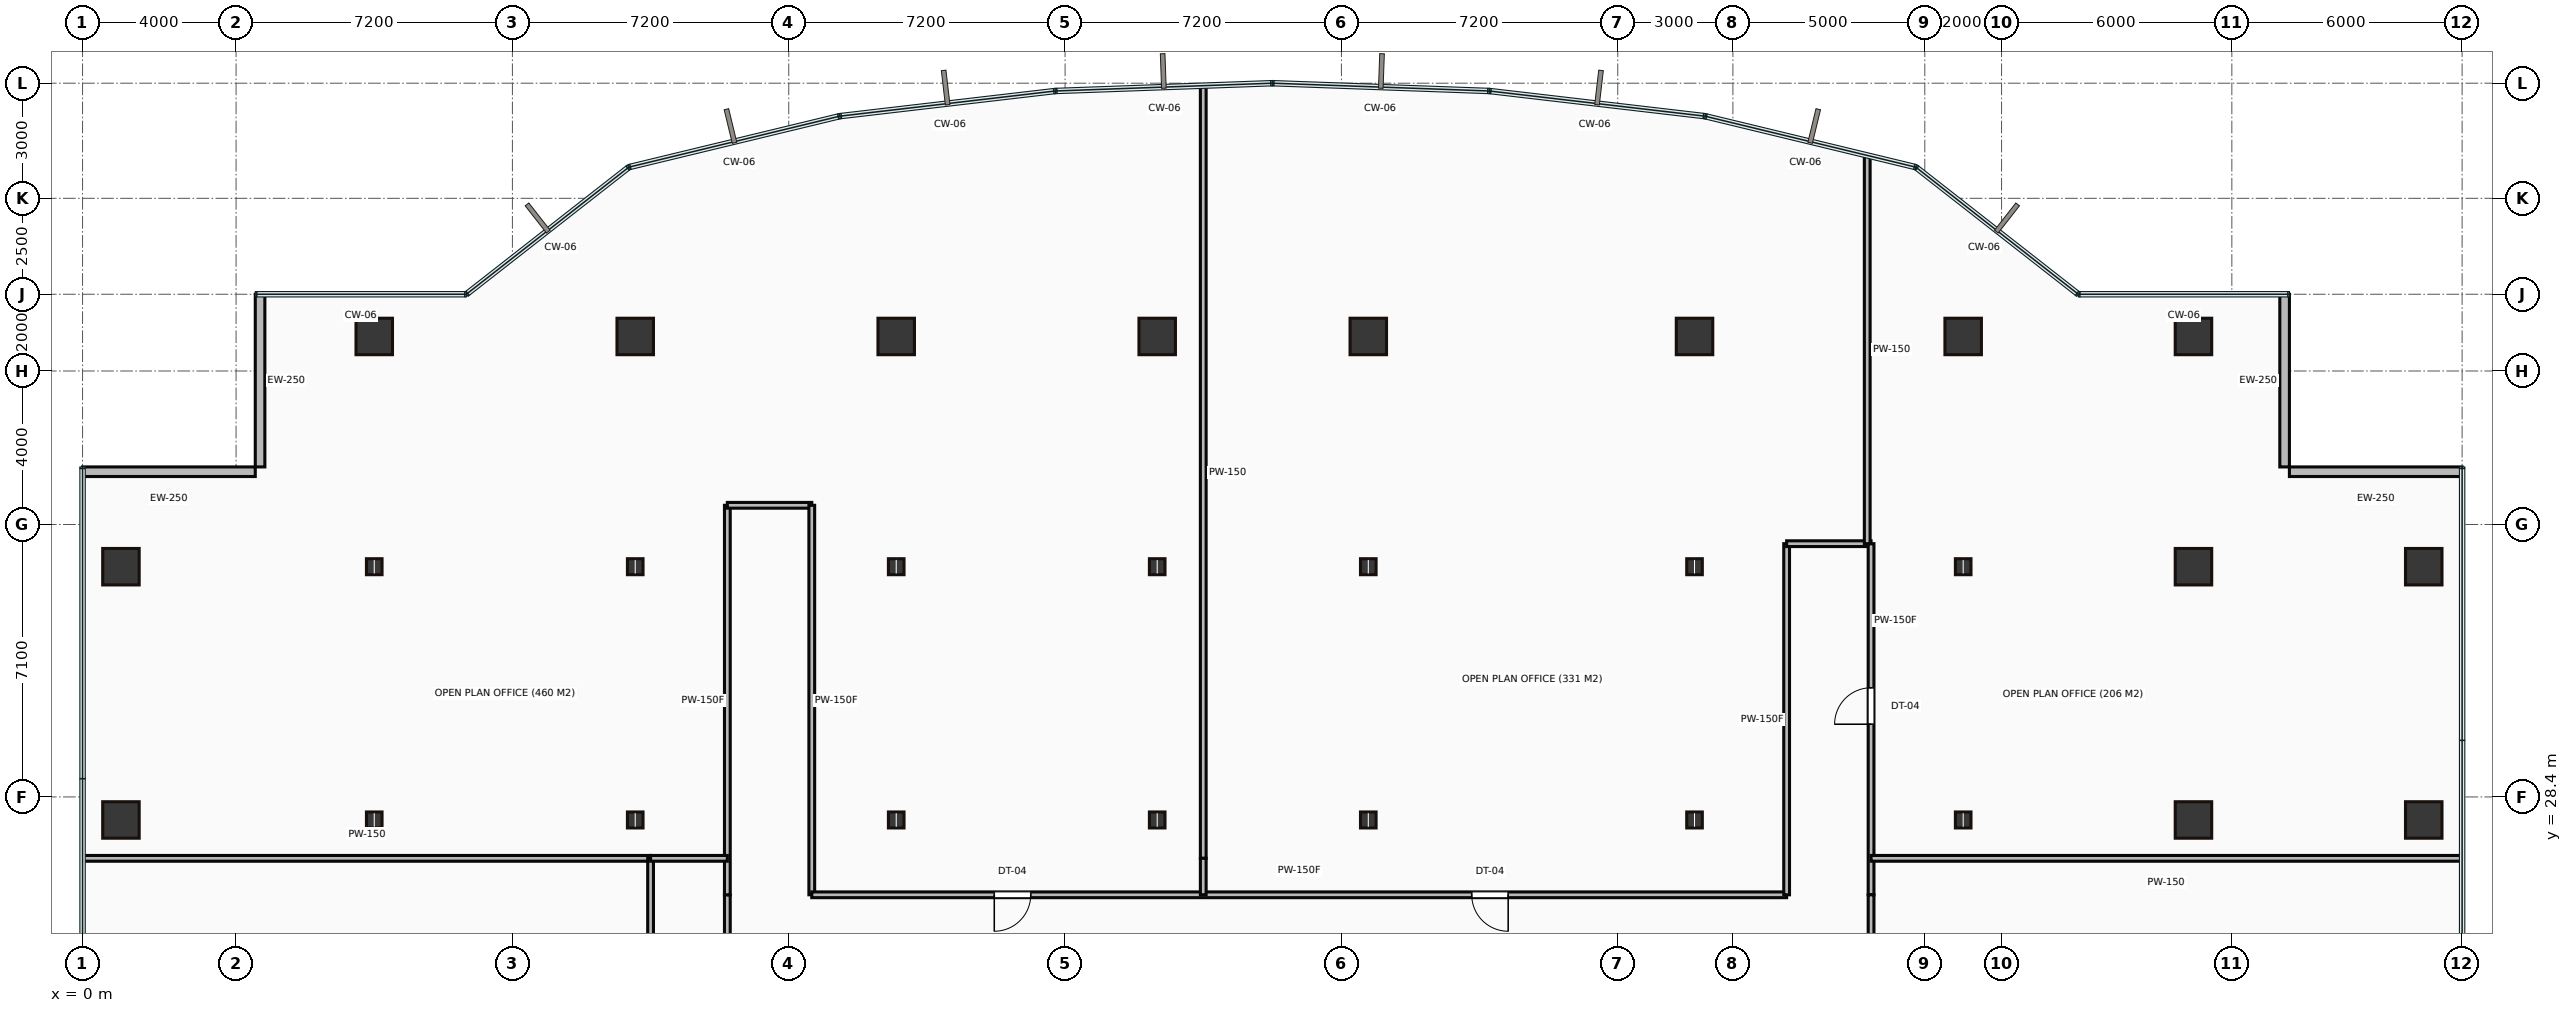
"""IFC4 building model, lengths in metres.
Left out: names, types, materials, properties, quantities, classifications, styles, units other than length and angle.
Written with IfcOpenShell. Run it as: python <this file> out.ifc"""

import sys

from ifc_helpers import new_model, si_unit, direction, frame, frame_2d, origin, origin_2d, place, context, subcontext, project, spatial, rectangle, hollow_rectangle, i_section, extrude, source, transform, mapped, element, fill, save


model = new_model("IFC4")
c1 = context("Model", 3, precision=1e-05, world=origin(), true_north=direction((0.0, 1.0)))
c2 = subcontext(c1, "Body", "Model", "MODEL_VIEW")
j1 = project(units=[si_unit("LENGTHUNIT", "METRE"), si_unit("PLANEANGLEUNIT", "RADIAN")], contexts=[c1])
p1 = place(None, origin())
s1 = spatial("IfcSite", under=j1, at=p1, CompositionType="ELEMENT")
p2 = place(p1, origin())
s2 = spatial("IfcBuilding", under=s1, at=p2, CompositionType="ELEMENT")
p3 = place(p2, frame((0.0, 0.0, 79.95)))
s3 = spatial("IfcBuildingStorey", under=s2, at=p3, CompositionType="ELEMENT", Elevation=79.95)
m1 = source(origin(), c2, "Body", "SweptSolid", [
    extrude(hollow_rectangle(XDim=0.95, YDim=0.95, WallThickness=0.045, at=origin_2d()), origin(), (0.0, 0.0, 1.0), 4.2),
])
for number, where, z_axis, x_axis in (
    (1, (1.0, 27.8, 0.0), (0.0, 0.0, 1.0), (1.0, 0.0, 0.0)),
    (2, (1.0, 34.4, 0.0), (0.0, 0.0, 1.0), (1.0, 0.0, 0.0)),
):
    element("IfcColumn", number, at=place(p3, frame(where, z_axis=z_axis, x_axis=x_axis)), inside=s3, PredefinedType="COLUMN", context=c2, shape_type="MappedRepresentation", body=[
        mapped(m1, transform((0.0, 0.0, 0.0))),
    ])
m2 = source(origin(), c2, "Body", "SweptSolid", [
    extrude(i_section(OverallWidth=0.406, OverallDepth=0.416, WebThickness=0.03, FlangeThickness=0.048, at=origin_2d()), origin(), (0.0, 0.0, 1.0), 4.2),
])
for number, where, z_axis, x_axis in (
    (3, (7.6, 27.8, 0.0), (0.0, 0.0, 1.0), (1.0, 0.0, 0.0)),
    (4, (7.6, 34.4, 0.0), (0.0, 0.0, 1.0), (1.0, 0.0, 0.0)),
):
    element("IfcColumn", number, at=place(p3, frame(where, z_axis=z_axis, x_axis=x_axis)), inside=s3, PredefinedType="COLUMN", context=c2, shape_type="MappedRepresentation", body=[
        mapped(m2, transform((0.0, 0.0, 0.0))),
    ])
p4 = place(p3, frame((7.6, 40.4, 0.0), z_axis=(0.0, 0.0, 1.0), x_axis=(1.0, 0.0, 0.0)))
e5 = element("IfcColumn", 5, at=p4, inside=s3, PredefinedType="COLUMN", context=c2, shape_type="MappedRepresentation", body=[
    mapped(m1, transform((0.0, 0.0, 0.0))),
])
for number, where, z_axis, x_axis in (
    (6, (14.4, 27.8, 0.0), (0.0, 0.0, 1.0), (1.0, 0.0, 0.0)),
    (7, (14.4, 34.4, 0.0), (0.0, 0.0, 1.0), (1.0, 0.0, 0.0)),
):
    element("IfcColumn", number, at=place(p3, frame(where, z_axis=z_axis, x_axis=x_axis)), inside=s3, PredefinedType="COLUMN", context=c2, shape_type="MappedRepresentation", body=[
        mapped(m2, transform((0.0, 0.0, 0.0))),
    ])
p5 = place(p3, frame((14.4, 40.4, 0.0), z_axis=(0.0, 0.0, 1.0), x_axis=(1.0, 0.0, 0.0)))
e8 = element("IfcColumn", 8, at=p5, inside=s3, PredefinedType="COLUMN", context=c2, shape_type="MappedRepresentation", body=[
    mapped(m1, transform((0.0, 0.0, 0.0))),
])
for number, where, z_axis, x_axis in (
    (9, (21.2, 27.8, 0.0), (0.0, 0.0, 1.0), (1.0, 0.0, 0.0)),
    (10, (21.2, 34.4, 0.0), (0.0, 0.0, 1.0), (1.0, 0.0, 0.0)),
):
    element("IfcColumn", number, at=place(p3, frame(where, z_axis=z_axis, x_axis=x_axis)), inside=s3, PredefinedType="COLUMN", context=c2, shape_type="MappedRepresentation", body=[
        mapped(m2, transform((0.0, 0.0, 0.0))),
    ])
p6 = place(p3, frame((21.2, 40.4, 0.0), z_axis=(0.0, 0.0, 1.0), x_axis=(1.0, 0.0, 0.0)))
e11 = element("IfcColumn", 11, at=p6, inside=s3, PredefinedType="COLUMN", context=c2, shape_type="MappedRepresentation", body=[
    mapped(m1, transform((0.0, 0.0, 0.0))),
])
for number, where, z_axis, x_axis in (
    (12, (28.0, 27.8, 0.0), (0.0, 0.0, 1.0), (1.0, 0.0, 0.0)),
    (13, (28.0, 34.4, 0.0), (0.0, 0.0, 1.0), (1.0, 0.0, 0.0)),
):
    element("IfcColumn", number, at=place(p3, frame(where, z_axis=z_axis, x_axis=x_axis)), inside=s3, PredefinedType="COLUMN", context=c2, shape_type="MappedRepresentation", body=[
        mapped(m2, transform((0.0, 0.0, 0.0))),
    ])
p7 = place(p3, frame((28.0, 40.4, 0.0), z_axis=(0.0, 0.0, 1.0), x_axis=(1.0, 0.0, 0.0)))
e14 = element("IfcColumn", 14, at=p7, inside=s3, PredefinedType="COLUMN", context=c2, shape_type="MappedRepresentation", body=[
    mapped(m1, transform((0.0, 0.0, 0.0))),
])
for number, where, z_axis, x_axis in (
    (15, (33.5, 27.8, 0.0), (0.0, 0.0, 1.0), (1.0, 0.0, 0.0)),
    (16, (33.5, 34.4, 0.0), (0.0, 0.0, 1.0), (1.0, 0.0, 0.0)),
):
    element("IfcColumn", number, at=place(p3, frame(where, z_axis=z_axis, x_axis=x_axis)), inside=s3, PredefinedType="COLUMN", context=c2, shape_type="MappedRepresentation", body=[
        mapped(m2, transform((0.0, 0.0, 0.0))),
    ])
p8 = place(p3, frame((33.5, 40.4, 0.0), z_axis=(0.0, 0.0, 1.0), x_axis=(1.0, 0.0, 0.0)))
e17 = element("IfcColumn", 17, at=p8, inside=s3, PredefinedType="COLUMN", context=c2, shape_type="MappedRepresentation", body=[
    mapped(m1, transform((0.0, 0.0, 0.0))),
])
for number, where, z_axis, x_axis in (
    (18, (42.0, 27.8, 0.0), (0.0, 0.0, 1.0), (1.0, 0.0, 0.0)),
    (19, (42.0, 34.4, 0.0), (0.0, 0.0, 1.0), (1.0, 0.0, 0.0)),
):
    element("IfcColumn", number, at=place(p3, frame(where, z_axis=z_axis, x_axis=x_axis)), inside=s3, PredefinedType="COLUMN", context=c2, shape_type="MappedRepresentation", body=[
        mapped(m2, transform((0.0, 0.0, 0.0))),
    ])
p9 = place(p3, frame((42.0, 40.4, 0.0), z_axis=(0.0, 0.0, 1.0), x_axis=(1.0, 0.0, 0.0)))
e20 = element("IfcColumn", 20, at=p9, inside=s3, PredefinedType="COLUMN", context=c2, shape_type="MappedRepresentation", body=[
    mapped(m1, transform((0.0, 0.0, 0.0))),
])
for number, where, z_axis, x_axis in (
    (21, (49.0, 27.8, 0.0), (0.0, 0.0, 1.0), (1.0, 0.0, 0.0)),
    (22, (49.0, 34.4, 0.0), (0.0, 0.0, 1.0), (1.0, 0.0, 0.0)),
):
    element("IfcColumn", number, at=place(p3, frame(where, z_axis=z_axis, x_axis=x_axis)), inside=s3, PredefinedType="COLUMN", context=c2, shape_type="MappedRepresentation", body=[
        mapped(m2, transform((0.0, 0.0, 0.0))),
    ])
for number, where, z_axis, x_axis in (
    (23, (49.0, 40.4, 0.0), (0.0, 0.0, 1.0), (1.0, 0.0, 0.0)),
    (24, (55.0, 27.8, 0.0), (0.0, 0.0, 1.0), (1.0, 0.0, 0.0)),
    (25, (55.0, 34.4, 0.0), (0.0, 0.0, 1.0), (1.0, 0.0, 0.0)),
    (26, (55.0, 40.4, 0.0), (0.0, 0.0, 1.0), (1.0, 0.0, 0.0)),
    (27, (61.0, 27.8, 0.0), (0.0, 0.0, 1.0), (1.0, 0.0, 0.0)),
    (28, (61.0, 34.4, 0.0), (0.0, 0.0, 1.0), (1.0, 0.0, 0.0)),
):
    element("IfcColumn", number, at=place(p3, frame(where, z_axis=z_axis, x_axis=x_axis)), inside=s3, PredefinedType="COLUMN", context=c2, shape_type="MappedRepresentation", body=[
        mapped(m1, transform((0.0, 0.0, 0.0))),
    ])
m3 = source(origin(), c2, "Body", "SweptSolid", [
    extrude(rectangle(XDim=4.5, YDim=0.25, at=frame_2d((2.25, 0.0))), origin(), (0.0, 0.0, 1.0), 3.9),
])
for number, where, z_axis, x_axis in (
    (29, (62.0, 36.875, 0.0), (0.0, 0.0, 1.0), (-1.0, 0.0, 0.0)),
    (30, (57.375, 37.0, 0.0), (0.0, 0.0, 1.0), (0.0, 1.0, 0.0)),
    (31, (4.625, 41.5, 0.0), (0.0, 0.0, 1.0), (0.0, -1.0, 0.0)),
    (32, (4.5, 36.875, 0.0), (0.0, 0.0, 1.0), (-1.0, 0.0, 0.0)),
):
    element("IfcWall", number, at=place(p3, frame(where, z_axis=z_axis, x_axis=x_axis)), inside=s3, PredefinedType="STANDARD", context=c2, shape_type="MappedRepresentation", body=[
        mapped(m3, transform((0.0, 0.0, 0.0))),
    ])
m4 = source(origin(), c2, "Body", "SweptSolid", [
    extrude(rectangle(XDim=2.05, YDim=0.15, at=frame_2d((1.025, 0.0))), origin(), (0.0, 0.0, 1.0), 3.9),
])
p10 = place(p3, frame((16.8, 23.8, 0.0), z_axis=(0.0, 0.0, 1.0), x_axis=(0.0, 1.0, 0.0)))
e33 = element("IfcWall", 33, at=p10, inside=s3, PredefinedType="PARTITIONING", context=c2, shape_type="MappedRepresentation", body=[
    mapped(m4, transform((0.0, 0.0, 0.0))),
])
m5 = source(origin(), c2, "Body", "SweptSolid", [
    extrude(rectangle(XDim=10.15, YDim=0.15, at=frame_2d((5.075, 0.0))), origin(), (0.0, 0.0, 1.0), 3.9),
])
p11 = place(p3, frame((16.8, 25.85, 0.0), z_axis=(0.0, 0.0, 1.0), x_axis=(0.0, 1.0, 0.0)))
e34 = element("IfcWall", 34, at=p11, inside=s3, PredefinedType="PARTITIONING", context=c2, shape_type="MappedRepresentation", body=[
    mapped(m5, transform((0.0, 0.0, 0.0))),
])
m6 = source(origin(), c2, "Body", "SweptSolid", [
    extrude(rectangle(XDim=2.2, YDim=0.15, at=frame_2d((1.1, 0.0))), origin(), (0.0, 0.0, 1.0), 3.9),
])
p12 = place(p3, frame((16.8, 36.0, 0.0), z_axis=(0.0, 0.0, 1.0), x_axis=(1.0, 0.0, 0.0)))
e35 = element("IfcWall", 35, at=p12, inside=s3, PredefinedType="PARTITIONING", context=c2, shape_type="MappedRepresentation", body=[
    mapped(m6, transform((0.0, 0.0, 0.0))),
])
p13 = place(p3, frame((19.0, 36.0, 0.0), z_axis=(0.0, 0.0, 1.0), x_axis=(0.0, -1.0, 0.0)))
e36 = element("IfcWall", 36, at=p13, inside=s3, PredefinedType="PARTITIONING", context=c2, shape_type="MappedRepresentation", body=[
    mapped(m5, transform((0.0, 0.0, 0.0))),
])
m7 = source(origin(), c2, "Body", "SweptSolid", [
    extrude(rectangle(XDim=25.4, YDim=0.15, at=frame_2d((12.7, 0.0))), origin(), (0.0, 0.0, 1.0), 3.9),
])
p14 = place(p3, frame((19.0, 25.85, 0.0), z_axis=(0.0, 0.0, 1.0), x_axis=(1.0, 0.0, 0.0)))
e37 = element("IfcWall", 37, at=p14, inside=s3, PredefinedType="PARTITIONING", context=c2, shape_type="MappedRepresentation", body=[
    mapped(m7, transform((0.0, 0.0, 0.0))),
])
p15 = place(p14, frame((4.755, 0.0, 0.0)))
e38 = element("IfcOpeningElement", 38, at=p15, cuts=e37, PredefinedType="OPENING", context=c2, shape_type="SweptSolid", body=[
    extrude(rectangle(XDim=0.95, YDim=2.15, at=frame_2d((0.475, 1.075))), frame((0.0, 0.085, 0.0), z_axis=(0.0, -1.0, 0.0), x_axis=(1.0, 0.0, 0.0)), (0.0, 0.0, 1.0), 0.17),
])
p16 = place(p14, frame((17.195, 0.0, 0.0)))
e39 = element("IfcOpeningElement", 39, at=p16, cuts=e37, PredefinedType="OPENING", context=c2, shape_type="SweptSolid", body=[
    extrude(rectangle(XDim=0.95, YDim=2.15, at=frame_2d((0.475, 1.075))), frame((0.0, 0.085, 0.0), z_axis=(0.0, -1.0, 0.0), x_axis=(1.0, 0.0, 0.0)), (0.0, 0.0, 1.0), 0.17),
])
m8 = source(origin(), c2, "Body", "SweptSolid", [
    extrude(rectangle(XDim=9.15, YDim=0.15, at=frame_2d((4.575, 0.0))), origin(), (0.0, 0.0, 1.0), 3.9),
])
p17 = place(p3, frame((44.4, 25.85, 0.0), z_axis=(0.0, 0.0, 1.0), x_axis=(0.0, 1.0, 0.0)))
e40 = element("IfcWall", 40, at=p17, inside=s3, PredefinedType="PARTITIONING", context=c2, shape_type="MappedRepresentation", body=[
    mapped(m8, transform((0.0, 0.0, 0.0))),
])
m9 = source(origin(), c2, "Body", "SweptSolid", [
    extrude(rectangle(XDim=2.2, YDim=0.15, at=frame_2d((1.1, 0.0))), origin(), (0.0, 0.0, 1.0), 3.9),
])
p18 = place(p3, frame((44.4, 35.0, 0.0), z_axis=(0.0, 0.0, 1.0), x_axis=(1.0, 0.0, 0.0)))
e41 = element("IfcWall", 41, at=p18, inside=s3, PredefinedType="PARTITIONING", context=c2, shape_type="MappedRepresentation", body=[
    mapped(m9, transform((0.0, 0.0, 0.0))),
])
p19 = place(p3, frame((46.6, 35.0, 0.0), z_axis=(0.0, 0.0, 1.0), x_axis=(0.0, -1.0, 0.0)))
e42 = element("IfcWall", 42, at=p19, inside=s3, PredefinedType="PARTITIONING", context=c2, shape_type="MappedRepresentation", body=[
    mapped(m8, transform((0.0, 0.0, 0.0))),
])
p20 = place(p19, frame((3.755, 0.0, 0.0)))
e43 = element("IfcOpeningElement", 43, at=p20, cuts=e42, PredefinedType="OPENING", context=c2, shape_type="SweptSolid", body=[
    extrude(rectangle(XDim=0.95, YDim=2.15, at=frame_2d((0.475, 1.075))), frame((0.0, 0.085, 0.0), z_axis=(0.0, -1.0, 0.0), x_axis=(1.0, 0.0, 0.0)), (0.0, 0.0, 1.0), 0.17),
])
p21 = place(p3, frame((46.6, 25.85, 0.0), z_axis=(0.0, 0.0, 1.0), x_axis=(0.0, -1.0, 0.0)))
e44 = element("IfcWall", 44, at=p21, inside=s3, PredefinedType="PARTITIONING", context=c2, shape_type="MappedRepresentation", body=[
    mapped(m4, transform((0.0, 0.0, 0.0))),
])
m10 = source(origin(), c2, "Body", "SweptSolid", [
    extrude(rectangle(XDim=14.78, YDim=0.15, at=frame_2d((7.39, 0.0))), origin(), (0.0, 0.0, 1.0), 3.9),
])
p22 = place(p3, frame((0.02, 26.8, 0.0), z_axis=(0.0, 0.0, 1.0), x_axis=(1.0, 0.0, 0.0)))
e45 = element("IfcWall", 45, at=p22, inside=s3, PredefinedType="PARTITIONING", context=c2, shape_type="MappedRepresentation", body=[
    mapped(m10, transform((0.0, 0.0, 0.0))),
])
m11 = source(origin(), c2, "Body", "SweptSolid", [
    extrude(rectangle(XDim=10.55, YDim=0.15, at=frame_2d((5.275, 0.0))), origin(), (0.0, 0.0, 1.0), 3.9),
])
p23 = place(p3, frame((14.8, 26.8, 0.0), z_axis=(0.0, 0.0, 1.0), x_axis=(0.0, -1.0, 0.0)))
e46 = element("IfcWall", 46, at=p23, inside=s3, PredefinedType="PARTITIONING", context=c2, shape_type="MappedRepresentation", body=[
    mapped(m11, transform((0.0, 0.0, 0.0))),
])
m12 = source(origin(), c2, "Body", "SweptSolid", [
    extrude(rectangle(XDim=2.0, YDim=0.15, at=frame_2d((1.0, 0.0))), origin(), (0.0, 0.0, 1.0), 3.9),
])
p24 = place(p3, frame((14.8, 26.8, 0.0), z_axis=(0.0, 0.0, 1.0), x_axis=(1.0, 0.0, 0.0)))
e47 = element("IfcWall", 47, at=p24, inside=s3, PredefinedType="PARTITIONING", context=c2, shape_type="MappedRepresentation", body=[
    mapped(m12, transform((0.0, 0.0, 0.0))),
])
m13 = source(origin(), c2, "Body", "SweptSolid", [
    extrude(rectangle(XDim=20.115, YDim=0.15, at=frame_2d((10.058, 0.0))), origin(), (0.0, 0.0, 1.0), 3.9),
])
p25 = place(p3, frame((29.2, 46.915, 0.0), z_axis=(0.0, 0.0, 1.0), x_axis=(0.0, -1.0, 0.0)))
e48 = element("IfcWall", 48, at=p25, inside=s3, PredefinedType="PARTITIONING", context=c2, shape_type="MappedRepresentation", body=[
    mapped(m13, transform((0.0, 0.0, 0.0))),
])
m14 = source(origin(), c2, "Body", "SweptSolid", [
    extrude(rectangle(XDim=0.95, YDim=0.15, at=frame_2d((0.475, 0.0))), origin(), (0.0, 0.0, 1.0), 3.9),
])
p26 = place(p3, frame((29.2, 26.8, 0.0), z_axis=(0.0, 0.0, 1.0), x_axis=(0.0, -1.0, 0.0)))
e49 = element("IfcWall", 49, at=p26, inside=s3, PredefinedType="PARTITIONING", context=c2, shape_type="MappedRepresentation", body=[
    mapped(m14, transform((0.0, 0.0, 0.0))),
])
m15 = source(origin(), c2, "Body", "SweptSolid", [
    extrude(rectangle(XDim=10.097, YDim=0.15, at=frame_2d((5.049, 0.0))), origin(), (0.0, 0.0, 1.0), 3.9),
])
p27 = place(p3, frame((46.5, 45.097, 0.0), z_axis=(0.0, 0.0, 1.0), x_axis=(0.0, -1.0, 0.0)))
e50 = element("IfcWall", 50, at=p27, inside=s3, PredefinedType="PARTITIONING", context=c2, shape_type="MappedRepresentation", body=[
    mapped(m15, transform((0.0, 0.0, 0.0))),
])
m16 = source(origin(), c2, "Body", "SweptSolid", [
    extrude(rectangle(XDim=15.38, YDim=0.15, at=frame_2d((7.69, 0.0))), origin(), (0.0, 0.0, 1.0), 3.9),
])
p28 = place(p3, frame((61.98, 26.8, 0.0), z_axis=(0.0, 0.0, 1.0), x_axis=(-1.0, 0.0, 0.0)))
e51 = element("IfcWall", 51, at=p28, inside=s3, PredefinedType="PARTITIONING", context=c2, shape_type="MappedRepresentation", body=[
    mapped(m16, transform((0.0, 0.0, 0.0))),
])
m17 = source(origin(), c2, "Body", "SweptSolid", [
    extrude(rectangle(XDim=0.95, YDim=2.15, at=frame_2d((0.475, 1.075))), frame((0.0, 0.025, 0.0), z_axis=(0.0, -1.0, 0.0), x_axis=(1.0, 0.0, 0.0)), (0.0, 0.0, 1.0), 0.05),
])
p29 = place(p15, origin())
e52 = element("IfcDoor", 52, at=p29, inside=s3, OperationType="SINGLE_SWING_LEFT", PredefinedType="DOOR", context=c2, shape_type="MappedRepresentation", body=[
    mapped(m17, transform((0.0, 0.0, 0.0))),
])
fill(e38, e52)
p30 = place(p16, origin())
e53 = element("IfcDoor", 53, at=p30, inside=s3, OperationType="SINGLE_SWING_RIGHT", PredefinedType="DOOR", context=c2, shape_type="MappedRepresentation", body=[
    mapped(m17, transform((0.0, 0.0, 0.0))),
])
fill(e39, e53)
p31 = place(p20, origin())
e54 = element("IfcDoor", 54, at=p31, inside=s3, OperationType="SINGLE_SWING_RIGHT", PredefinedType="DOOR", context=c2, shape_type="MappedRepresentation", body=[
    mapped(m17, transform((0.0, 0.0, 0.0))),
])
fill(e43, e54)
save(model, sys.argv[1])
